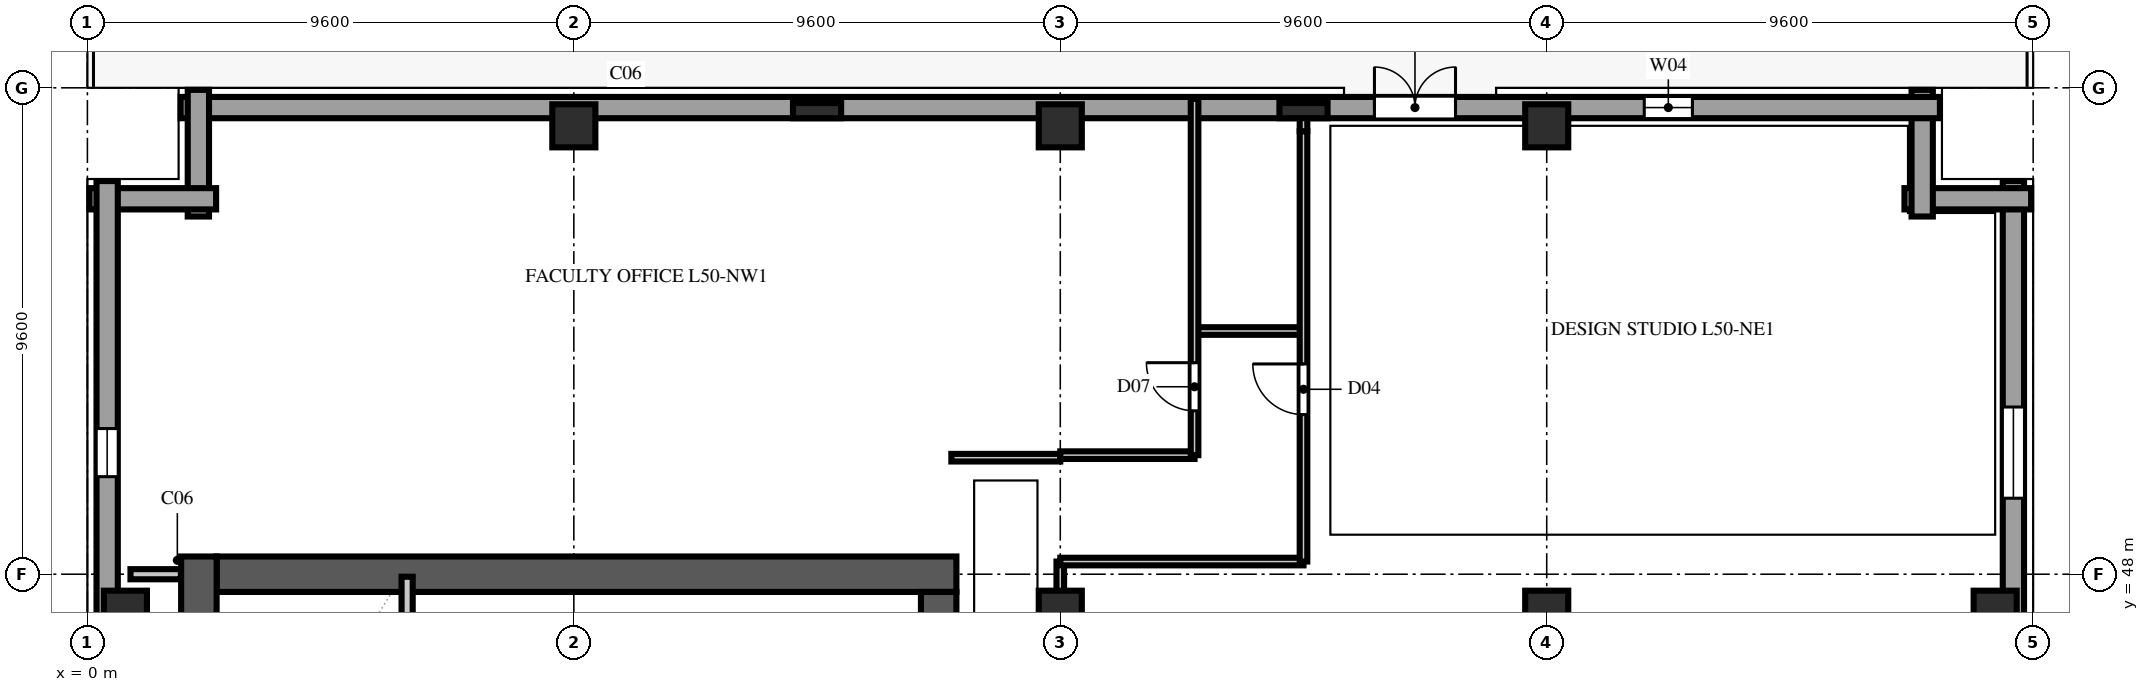
"""IFC4 building model, lengths in metres.
Left out: names, types, materials, properties, quantities, classifications, styles, units other than length and angle.
Written with IfcOpenShell. Run it as: python <this file> out.ifc"""

import sys

from ifc_helpers import new_model, si_unit, direction, frame, frame_2d, origin, origin_2d, place, context, subcontext, project, spatial, rectangle, extrude, element, fill, save


model = new_model("IFC4")
c1 = context("Model", 3, precision=1e-05, world=origin(), true_north=direction((0.0, 1.0)))
c2 = subcontext(c1, "Body", "Model", "MODEL_VIEW")
j1 = project(units=[si_unit("LENGTHUNIT", "METRE"), si_unit("PLANEANGLEUNIT", "RADIAN")], contexts=[c1])
p1 = place(None, origin())
s1 = spatial("IfcSite", under=j1, at=p1, CompositionType="ELEMENT")
p2 = place(p1, origin())
s2 = spatial("IfcBuilding", under=s1, at=p2, CompositionType="ELEMENT")
p3 = place(p2, frame((0.0, 0.0, 199.0)))
s3 = spatial("IfcBuildingStorey", under=s2, at=p3, CompositionType="ELEMENT", Elevation=199.0)
p4 = place(p3, frame((2.55, 48.0, 0.0), z_axis=(0.0, 0.0, 1.0), x_axis=(1.0, 0.0, 0.0)))
e1 = element("IfcWall", 1, at=p4, inside=s3, PredefinedType="SHEAR", context=c2, shape_type="SweptSolid", body=[
    extrude(rectangle(XDim=14.6, YDim=0.7, at=frame_2d((7.3, 0.0))), origin(), (0.0, 0.0, 1.0), 3.54),
])
p5 = place(p3, frame((2.2, 9.25, 0.0), z_axis=(0.0, 0.0, 1.0), x_axis=(0.0, 1.0, 0.0)))
e2 = element("IfcWall", 2, at=p5, inside=s3, PredefinedType="SHEAR", context=c2, shape_type="SweptSolid", body=[
    extrude(rectangle(XDim=39.1, YDim=0.7, at=frame_2d((19.55, 0.0))), origin(), (0.0, 0.0, 1.0), 3.54),
])
p6 = place(p3, frame((16.8, 36.4, 0.0), z_axis=(0.0, 0.0, 1.0), x_axis=(0.0, 1.0, 0.0)))
e3 = element("IfcWall", 3, at=p6, inside=s3, PredefinedType="SHEAR", context=c2, shape_type="SweptSolid", body=[
    extrude(rectangle(XDim=11.25, YDim=0.7, at=frame_2d((5.625, 0.0))), origin(), (0.0, 0.0, 1.0), 3.54),
])
p7 = place(p6, frame((9.2, 0.0, 0.0)))
e4 = element("IfcOpeningElement", 4, at=p7, cuts=e3, PredefinedType="OPENING", context=c2, shape_type="SweptSolid", body=[
    extrude(rectangle(XDim=0.95, YDim=2.15, at=frame_2d((0.475, 1.075))), frame((0.0, 0.362, 0.0), z_axis=(0.0, -1.0, 0.0), x_axis=(1.0, 0.0, 0.0)), (0.0, 0.0, 1.0), 0.724),
])
for number, where, z_axis, x_axis in (
    (5, (0.75, 47.25, 0.0), (0.0, 0.0, 1.0), (1.0, 0.0, 0.0)),
    (6, (9.6, 56.85, 0.0), (0.0, 0.0, 1.0), (1.0, 0.0, 0.0)),
    (7, (19.2, 47.25, 0.0), (0.0, 0.0, 1.0), (1.0, 0.0, 0.0)),
    (8, (19.2, 56.85, 0.0), (0.0, 0.0, 1.0), (1.0, 0.0, 0.0)),
    (9, (28.8, 47.25, 0.0), (0.0, 0.0, 1.0), (1.0, 0.0, 0.0)),
    (10, (28.8, 56.85, 0.0), (0.0, 0.0, 1.0), (1.0, 0.0, 0.0)),
    (11, (37.65, 47.25, 0.0), (0.0, 0.0, 1.0), (1.0, 0.0, 0.0)),
):
    element("IfcColumn", number, at=place(p3, frame(where, z_axis=z_axis, x_axis=x_axis)), inside=s3, PredefinedType="COLUMN", context=c2, shape_type="SweptSolid", body=[
        extrude(rectangle(XDim=0.85, YDim=0.85, at=origin_2d()), origin(), (0.0, 0.0, 1.0), 3.8),
    ])
for number, where, z_axis, x_axis in (
    (12, (14.4, 57.15, 0.0), (0.0, 0.0, 1.0), (1.0, 0.0, 0.0)),
    (13, (24.0, 57.15, 0.0), (0.0, 0.0, 1.0), (1.0, 0.0, 0.0)),
):
    element("IfcColumn", number, at=place(p3, frame(where, z_axis=z_axis, x_axis=x_axis)), inside=s3, PredefinedType="PILASTER", context=c2, shape_type="SweptSolid", body=[
        extrude(rectangle(XDim=0.95, YDim=0.3, at=origin_2d()), origin(), (0.0, 0.0, 1.0), 3.8),
    ])
p8 = place(p3, frame((38.01, 37.66, 0.0), z_axis=(0.0, 0.0, 1.0), x_axis=(0.0, 1.0, 0.0)))
e14 = element("IfcWall", 14, at=p8, inside=s3, PredefinedType="SOLIDWALL", context=c2, shape_type="SweptSolid", body=[
    extrude(rectangle(XDim=18.1, YDim=0.42, at=frame_2d((9.05, 0.0))), origin(), (0.0, 0.0, 1.0), 3.54),
])
p9 = place(p8, frame((2.24, 0.0, 0.85)))
e15 = element("IfcOpeningElement", 15, at=p9, cuts=e14, PredefinedType="OPENING", context=c2, shape_type="SweptSolid", body=[
    extrude(rectangle(XDim=1.8, YDim=1.85, at=frame_2d((0.9, 0.925))), frame((0.0, 0.222, 0.0), z_axis=(0.0, -1.0, 0.0), x_axis=(1.0, 0.0, 0.0)), (0.0, 0.0, 1.0), 0.444),
])
p10 = place(p8, frame((7.04, 0.0, 0.85)))
e16 = element("IfcOpeningElement", 16, at=p10, cuts=e14, PredefinedType="OPENING", context=c2, shape_type="SweptSolid", body=[
    extrude(rectangle(XDim=1.8, YDim=1.85, at=frame_2d((0.9, 0.925))), frame((0.0, 0.222, 0.0), z_axis=(0.0, -1.0, 0.0), x_axis=(1.0, 0.0, 0.0)), (0.0, 0.0, 1.0), 0.444),
])
p11 = place(p8, frame((11.84, 0.0, 0.85)))
e17 = element("IfcOpeningElement", 17, at=p11, cuts=e14, PredefinedType="OPENING", context=c2, shape_type="SweptSolid", body=[
    extrude(rectangle(XDim=1.8, YDim=1.85, at=frame_2d((0.9, 0.925))), frame((0.0, 0.222, 0.0), z_axis=(0.0, -1.0, 0.0), x_axis=(1.0, 0.0, 0.0)), (0.0, 0.0, 1.0), 0.444),
])
for number, where, z_axis, x_axis in (
    (18, (38.36, 55.41, 0.0), (0.0, 0.0, 1.0), (-1.0, 0.0, 0.0)),
    (19, (36.21, 55.06, 0.0), (0.0, 0.0, 1.0), (0.0, 1.0, 0.0)),
):
    element("IfcWall", number, at=place(p3, frame(where, z_axis=z_axis, x_axis=x_axis)), inside=s3, PredefinedType="SOLIDWALL", context=c2, shape_type="SweptSolid", body=[
        extrude(rectangle(XDim=2.5, YDim=0.42, at=frame_2d((1.25, 0.0))), origin(), (0.0, 0.0, 1.0), 3.54),
    ])
p12 = place(p3, frame((36.56, 57.21, 0.0), z_axis=(0.0, 0.0, 1.0), x_axis=(-1.0, 0.0, 0.0)))
e20 = element("IfcWall", 20, at=p12, inside=s3, PredefinedType="SOLIDWALL", context=c2, shape_type="SweptSolid", body=[
    extrude(rectangle(XDim=34.72, YDim=0.42, at=frame_2d((17.36, 0.0))), origin(), (0.0, 0.0, 1.0), 3.54),
])
p13 = place(p12, frame((9.56, 0.0, 0.0)))
e21 = element("IfcOpeningElement", 21, at=p13, cuts=e20, PredefinedType="OPENING", context=c2, shape_type="SweptSolid", body=[
    extrude(rectangle(XDim=1.6, YDim=2.3, at=frame_2d((0.8, 1.15))), frame((0.0, 0.222, 0.0), z_axis=(0.0, -1.0, 0.0), x_axis=(1.0, 0.0, 0.0)), (0.0, 0.0, 1.0), 0.444),
])
p14 = place(p12, frame((4.885, 0.0, 0.9)))
e22 = element("IfcOpeningElement", 22, at=p14, cuts=e20, PredefinedType="OPENING", context=c2, shape_type="SweptSolid", body=[
    extrude(rectangle(XDim=0.95, YDim=1.85, at=frame_2d((0.475, 0.925))), frame((0.0, 0.222, 0.0), z_axis=(0.0, -1.0, 0.0), x_axis=(1.0, 0.0, 0.0)), (0.0, 0.0, 1.0), 0.444),
])
for number, where, z_axis, x_axis in (
    (23, (2.19, 57.56, 0.0), (0.0, 0.0, 1.0), (0.0, -1.0, 0.0)),
    (24, (2.54, 55.41, 0.0), (0.0, 0.0, 1.0), (-1.0, 0.0, 0.0)),
):
    element("IfcWall", number, at=place(p3, frame(where, z_axis=z_axis, x_axis=x_axis)), inside=s3, PredefinedType="SOLIDWALL", context=c2, shape_type="SweptSolid", body=[
        extrude(rectangle(XDim=2.5, YDim=0.42, at=frame_2d((1.25, 0.0))), origin(), (0.0, 0.0, 1.0), 3.54),
    ])
p15 = place(p3, frame((0.39, 55.76, 0.0), z_axis=(0.0, 0.0, 1.0), x_axis=(0.0, -1.0, 0.0)))
e25 = element("IfcWall", 25, at=p15, inside=s3, PredefinedType="SOLIDWALL", context=c2, shape_type="SweptSolid", body=[
    extrude(rectangle(XDim=53.92, YDim=0.42, at=frame_2d((26.96, 0.0))), origin(), (0.0, 0.0, 1.0), 3.54),
])
p16 = place(p15, frame((4.885, 0.0, 0.9)))
e26 = element("IfcOpeningElement", 26, at=p16, cuts=e25, PredefinedType="OPENING", context=c2, shape_type="SweptSolid", body=[
    extrude(rectangle(XDim=0.95, YDim=1.85, at=frame_2d((0.475, 0.925))), frame((0.0, 0.222, 0.0), z_axis=(0.0, -1.0, 0.0), x_axis=(1.0, 0.0, 0.0)), (0.0, 0.0, 1.0), 0.444),
])
p17 = place(p15, frame((9.41, 0.0, 0.9)))
e27 = element("IfcOpeningElement", 27, at=p17, cuts=e25, PredefinedType="OPENING", context=c2, shape_type="SweptSolid", body=[
    extrude(rectangle(XDim=1.5, YDim=1.85, at=frame_2d((0.75, 0.925))), frame((0.0, 0.222, 0.0), z_axis=(0.0, -1.0, 0.0), x_axis=(1.0, 0.0, 0.0)), (0.0, 0.0, 1.0), 0.444),
])
p18 = place(p15, frame((14.485, 0.0, 0.9)))
e28 = element("IfcOpeningElement", 28, at=p18, cuts=e25, PredefinedType="OPENING", context=c2, shape_type="SweptSolid", body=[
    extrude(rectangle(XDim=0.95, YDim=1.85, at=frame_2d((0.475, 0.925))), frame((0.0, 0.222, 0.0), z_axis=(0.0, -1.0, 0.0), x_axis=(1.0, 0.0, 0.0)), (0.0, 0.0, 1.0), 0.444),
])
p19 = place(p15, frame((19.01, 0.0, 0.9)))
e29 = element("IfcOpeningElement", 29, at=p19, cuts=e25, PredefinedType="OPENING", context=c2, shape_type="SweptSolid", body=[
    extrude(rectangle(XDim=1.5, YDim=1.85, at=frame_2d((0.75, 0.925))), frame((0.0, 0.222, 0.0), z_axis=(0.0, -1.0, 0.0), x_axis=(1.0, 0.0, 0.0)), (0.0, 0.0, 1.0), 0.444),
])
p20 = place(p15, frame((24.085, 0.0, 0.9)))
e30 = element("IfcOpeningElement", 30, at=p20, cuts=e25, PredefinedType="OPENING", context=c2, shape_type="SweptSolid", body=[
    extrude(rectangle(XDim=0.95, YDim=1.85, at=frame_2d((0.475, 0.925))), frame((0.0, 0.222, 0.0), z_axis=(0.0, -1.0, 0.0), x_axis=(1.0, 0.0, 0.0)), (0.0, 0.0, 1.0), 0.444),
])
p21 = place(p15, frame((28.61, 0.0, 0.9)))
e31 = element("IfcOpeningElement", 31, at=p21, cuts=e25, PredefinedType="OPENING", context=c2, shape_type="SweptSolid", body=[
    extrude(rectangle(XDim=1.5, YDim=1.85, at=frame_2d((0.75, 0.925))), frame((0.0, 0.222, 0.0), z_axis=(0.0, -1.0, 0.0), x_axis=(1.0, 0.0, 0.0)), (0.0, 0.0, 1.0), 0.444),
])
p22 = place(p15, frame((33.685, 0.0, 0.9)))
e32 = element("IfcOpeningElement", 32, at=p22, cuts=e25, PredefinedType="OPENING", context=c2, shape_type="SweptSolid", body=[
    extrude(rectangle(XDim=0.95, YDim=1.85, at=frame_2d((0.475, 0.925))), frame((0.0, 0.222, 0.0), z_axis=(0.0, -1.0, 0.0), x_axis=(1.0, 0.0, 0.0)), (0.0, 0.0, 1.0), 0.444),
])
p23 = place(p15, frame((38.21, 0.0, 0.9)))
e33 = element("IfcOpeningElement", 33, at=p23, cuts=e25, PredefinedType="OPENING", context=c2, shape_type="SweptSolid", body=[
    extrude(rectangle(XDim=1.5, YDim=1.85, at=frame_2d((0.75, 0.925))), frame((0.0, 0.222, 0.0), z_axis=(0.0, -1.0, 0.0), x_axis=(1.0, 0.0, 0.0)), (0.0, 0.0, 1.0), 0.444),
])
p24 = place(p15, frame((43.285, 0.0, 0.9)))
e34 = element("IfcOpeningElement", 34, at=p24, cuts=e25, PredefinedType="OPENING", context=c2, shape_type="SweptSolid", body=[
    extrude(rectangle(XDim=0.95, YDim=1.85, at=frame_2d((0.475, 0.925))), frame((0.0, 0.222, 0.0), z_axis=(0.0, -1.0, 0.0), x_axis=(1.0, 0.0, 0.0)), (0.0, 0.0, 1.0), 0.444),
])
p25 = place(p15, frame((47.81, 0.0, 0.9)))
e35 = element("IfcOpeningElement", 35, at=p25, cuts=e25, PredefinedType="OPENING", context=c2, shape_type="SweptSolid", body=[
    extrude(rectangle(XDim=1.5, YDim=1.85, at=frame_2d((0.75, 0.925))), frame((0.0, 0.222, 0.0), z_axis=(0.0, -1.0, 0.0), x_axis=(1.0, 0.0, 0.0)), (0.0, 0.0, 1.0), 0.444),
])
p26 = place(p3, frame((6.31, 40.14, 0.0), z_axis=(0.0, 0.0, 1.0), x_axis=(0.0, 1.0, 0.0)))
e36 = element("IfcWall", 36, at=p26, inside=s3, PredefinedType="SOLIDWALL", context=c2, shape_type="SweptSolid", body=[
    extrude(rectangle(XDim=7.81, YDim=0.22, at=frame_2d((3.905, 0.0))), origin(), (0.0, 0.0, 1.0), 3.54),
])
p27 = place(p3, frame((0.85, 48.0, 0.0), z_axis=(0.0, 0.0, 1.0), x_axis=(1.0, 0.0, 0.0)))
e37 = element("IfcWall", 37, at=p27, inside=s3, PredefinedType="SOLIDWALL", context=c2, shape_type="SweptSolid", body=[
    extrude(rectangle(XDim=0.995, YDim=0.2, at=frame_2d((0.498, 0.0))), origin(), (0.0, 0.0, 1.0), 3.54),
])
p28 = place(p3, frame((17.05, 50.3, 0.0), z_axis=(0.0, 0.0, 1.0), x_axis=(1.0, 0.0, 0.0)))
e38 = element("IfcWall", 38, at=p28, inside=s3, PredefinedType="PARTITIONING", context=c2, shape_type="SweptSolid", body=[
    extrude(rectangle(XDim=2.15, YDim=0.15, at=frame_2d((1.075, 0.0))), origin(), (0.0, 0.0, 1.0), 3.54),
])
p29 = place(p3, frame((19.2, 38.18, 0.0), z_axis=(0.0, 0.0, 1.0), x_axis=(0.0, 1.0, 0.0)))
e39 = element("IfcWall", 39, at=p29, inside=s3, PredefinedType="PARTITIONING", context=c2, shape_type="SweptSolid", body=[
    extrude(rectangle(XDim=10.07, YDim=0.15, at=frame_2d((5.035, 0.0))), origin(), (0.0, 0.0, 1.0), 2.996),
])
p30 = place(p29, frame((3.85, 0.0, 0.0)))
e40 = element("IfcOpeningElement", 40, at=p30, cuts=e39, PredefinedType="OPENING", context=c2, shape_type="SweptSolid", body=[
    extrude(rectangle(XDim=0.95, YDim=2.15, at=frame_2d((0.475, 1.075))), frame((0.0, 0.087, 0.0), z_axis=(0.0, -1.0, 0.0), x_axis=(1.0, 0.0, 0.0)), (0.0, 0.0, 1.0), 0.174),
])
p31 = place(p3, frame((19.2, 48.25, 0.0), z_axis=(0.0, 0.0, 1.0), x_axis=(1.0, 0.0, 0.0)))
e41 = element("IfcWall", 41, at=p31, inside=s3, PredefinedType="PARTITIONING", context=c2, shape_type="SweptSolid", body=[
    extrude(rectangle(XDim=4.8, YDim=0.15, at=frame_2d((2.4, 0.0))), origin(), (0.0, 0.0, 1.0), 3.54),
])
p32 = place(p3, frame((19.2, 50.35, 0.0), z_axis=(0.0, 0.0, 1.0), x_axis=(1.0, 0.0, 0.0)))
e42 = element("IfcWall", 42, at=p32, inside=s3, PredefinedType="PARTITIONING", context=c2, shape_type="SweptSolid", body=[
    extrude(rectangle(XDim=2.65, YDim=0.15, at=frame_2d((1.325, 0.0))), origin(), (0.0, 0.0, 1.0), 3.54),
])
p33 = place(p3, frame((21.85, 52.8, 0.0), z_axis=(0.0, 0.0, 1.0), x_axis=(1.0, 0.0, 0.0)))
e43 = element("IfcWall", 43, at=p33, inside=s3, PredefinedType="PARTITIONING", context=c2, shape_type="SweptSolid", body=[
    extrude(rectangle(XDim=2.15, YDim=0.15, at=frame_2d((1.075, 0.0))), origin(), (0.0, 0.0, 1.0), 3.54),
])
p34 = place(p3, frame((24.0, 48.25, 0.0), z_axis=(0.0, 0.0, 1.0), x_axis=(0.0, 1.0, 0.0)))
e44 = element("IfcWall", 44, at=p34, inside=s3, PredefinedType="PARTITIONING", context=c2, shape_type="SweptSolid", body=[
    extrude(rectangle(XDim=8.494, YDim=0.15, at=frame_2d((4.247, 0.0))), origin(), (0.0, 0.0, 1.0), 3.007),
])
p35 = place(p34, frame((2.9, 0.0, 0.0)))
e45 = element("IfcOpeningElement", 45, at=p35, cuts=e44, PredefinedType="OPENING", context=c2, shape_type="SweptSolid", body=[
    extrude(rectangle(XDim=1.0, YDim=2.2, at=frame_2d((0.5, 1.1))), frame((0.0, 0.087, 0.0), z_axis=(0.0, -1.0, 0.0), x_axis=(1.0, 0.0, 0.0)), (0.0, 0.0, 1.0), 0.174),
])
p36 = place(p3, frame((24.0, 56.744, 0.0), z_axis=(0.0, 0.0, 1.0), x_axis=(0.0, 1.0, 0.0)))
e46 = element("IfcWall", 46, at=p36, inside=s3, PredefinedType="PARTITIONING", context=c2, shape_type="SweptSolid", body=[
    extrude(rectangle(XDim=0.636, YDim=0.15, at=frame_2d((0.318, 0.0))), origin(), (0.0, 0.0, 1.0), 3.54),
])
p37 = place(p3, frame((21.85, 50.35, 0.0), z_axis=(0.0, 0.0, 1.0), x_axis=(0.0, 1.0, 0.0)))
e47 = element("IfcWall", 47, at=p37, inside=s3, PredefinedType="PARTITIONING", context=c2, shape_type="SweptSolid", body=[
    extrude(rectangle(XDim=7.03, YDim=0.15, at=frame_2d((3.515, 0.0))), origin(), (0.0, 0.0, 1.0), 3.54),
])
p38 = place(p37, frame((0.875, 0.0, 0.0)))
e48 = element("IfcOpeningElement", 48, at=p38, cuts=e47, PredefinedType="OPENING", context=c2, shape_type="SweptSolid", body=[
    extrude(rectangle(XDim=0.95, YDim=2.15, at=frame_2d((0.475, 1.075))), frame((0.0, 0.087, 0.0), z_axis=(0.0, -1.0, 0.0), x_axis=(1.0, 0.0, 0.0)), (0.0, 0.0, 1.0), 0.174),
])
p39 = place(p11, origin())
e49 = element("IfcWindow", 49, at=p39, inside=s3, PartitioningType="DOUBLE_PANEL_VERTICAL", PredefinedType="WINDOW", context=c2, shape_type="SweptSolid", body=[
    extrude(rectangle(XDim=1.8, YDim=1.85, at=frame_2d((0.9, 0.925))), frame((0.0, 0.11, 0.0), z_axis=(0.0, -1.0, 0.0), x_axis=(1.0, 0.0, 0.0)), (0.0, 0.0, 1.0), 0.06),
])
fill(e17, e49)
p40 = place(p13, frame((1.6, 0.0, 0.0), z_axis=(0.0, 0.0, 1.0), x_axis=(-1.0, 0.0, 0.0)))
e50 = element("IfcDoor", 50, at=p40, inside=s3, OperationType="DOUBLE_SWING_LEFT", PredefinedType="DOOR", context=c2, shape_type="SweptSolid", body=[
    extrude(rectangle(XDim=1.6, YDim=2.3, at=frame_2d((0.8, 1.15))), frame((0.0, 0.025, 0.0), z_axis=(0.0, -1.0, 0.0), x_axis=(1.0, 0.0, 0.0)), (0.0, 0.0, 1.0), 0.05),
])
fill(e21, e50)
p41 = place(p14, origin())
e51 = element("IfcWindow", 51, at=p41, inside=s3, PartitioningType="SINGLE_PANEL", PredefinedType="WINDOW", context=c2, shape_type="SweptSolid", body=[
    extrude(rectangle(XDim=0.95, YDim=1.85, at=frame_2d((0.475, 0.925))), frame((0.0, 0.11, 0.0), z_axis=(0.0, -1.0, 0.0), x_axis=(1.0, 0.0, 0.0)), (0.0, 0.0, 1.0), 0.06),
])
fill(e22, e51)
p42 = place(p16, origin())
e52 = element("IfcWindow", 52, at=p42, inside=s3, PartitioningType="SINGLE_PANEL", PredefinedType="WINDOW", context=c2, shape_type="SweptSolid", body=[
    extrude(rectangle(XDim=0.95, YDim=1.85, at=frame_2d((0.475, 0.925))), frame((0.0, 0.11, 0.0), z_axis=(0.0, -1.0, 0.0), x_axis=(1.0, 0.0, 0.0)), (0.0, 0.0, 1.0), 0.06),
])
fill(e26, e52)
p43 = place(p35, origin())
e53 = element("IfcDoor", 53, at=p43, inside=s3, OperationType="SINGLE_SWING_RIGHT", PredefinedType="DOOR", context=c2, shape_type="SweptSolid", body=[
    extrude(rectangle(XDim=1.0, YDim=2.2, at=frame_2d((0.5, 1.1))), frame((0.0, 0.025, 0.0), z_axis=(0.0, -1.0, 0.0), x_axis=(1.0, 0.0, 0.0)), (0.0, 0.0, 1.0), 0.05),
])
fill(e45, e53)
p44 = place(p38, origin())
e54 = element("IfcDoor", 54, at=p44, inside=s3, OperationType="SINGLE_SWING_RIGHT", PredefinedType="DOOR", context=c2, shape_type="SweptSolid", body=[
    extrude(rectangle(XDim=0.95, YDim=2.15, at=frame_2d((0.475, 1.075))), frame((0.0, 0.025, 0.0), z_axis=(0.0, -1.0, 0.0), x_axis=(1.0, 0.0, 0.0)), (0.0, 0.0, 1.0), 0.05),
])
fill(e48, e54)
save(model, sys.argv[1])
